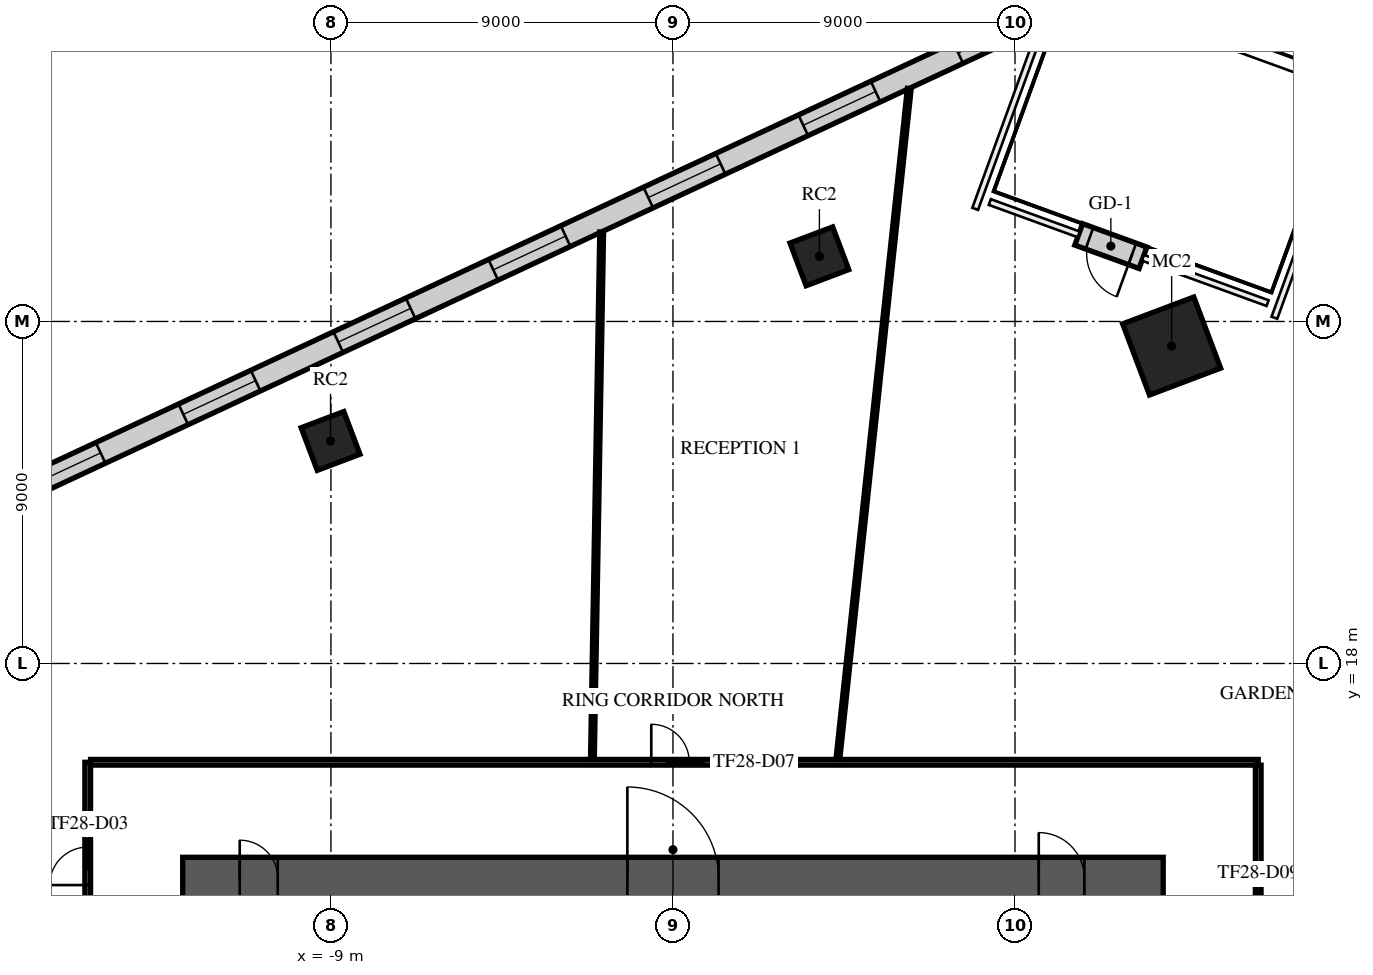
"""IFC4 building model, lengths in metres.
Left out: names, types, materials, properties, quantities, classifications, styles, units other than length and angle.
Written with IfcOpenShell. Run it as: python <this file> out.ifc"""

import sys

from ifc_helpers import new_model, si_unit, direction, frame, frame_2d, origin, origin_2d, place, context, subcontext, project, spatial, rectangle, extrude, element, fill, save


model = new_model("IFC4")
c1 = context("Model", 3, precision=1e-05, world=origin(), true_north=direction((0.0, 1.0)))
c2 = subcontext(c1, "Body", "Model", "MODEL_VIEW")
j1 = project(units=[si_unit("LENGTHUNIT", "METRE"), si_unit("PLANEANGLEUNIT", "RADIAN")], contexts=[c1])
p1 = place(None, origin())
s1 = spatial("IfcSite", under=j1, at=p1, CompositionType="ELEMENT")
p2 = place(p1, origin())
s2 = spatial("IfcBuilding", under=s1, at=p2, CompositionType="ELEMENT")
p3 = place(p2, frame((0.0, 0.0, 122.1)))
s3 = spatial("IfcBuildingStorey", under=s2, at=p3, CompositionType="ELEMENT", Elevation=122.1)
p4 = place(p3, frame((13.122, 26.354, 0.0), z_axis=(0.0, 0.0, 1.0), x_axis=(0.935491525991, 0.353349125935, 0.0)))
e1 = element("IfcColumn", 1, at=p4, inside=s3, PredefinedType="COLUMN", context=c2, shape_type="SweptSolid", body=[
    extrude(rectangle(XDim=2.0, YDim=2.0, at=origin_2d()), origin(), (0.0, 0.0, 1.0), 4.0),
])
for number, where, z_axis, x_axis in (
    (2, (3.853, 28.714, 0.0), (0.0, 0.0, 1.0), (0.935, 0.353, 0.0)),
    (3, (-9.01, 23.855, 0.0), (0.0, 0.0, 1.0), (0.935, 0.353, 0.0)),
):
    element("IfcColumn", number, at=place(p3, frame(where, z_axis=z_axis, x_axis=x_axis)), inside=s3, PredefinedType="COLUMN", context=c2, shape_type="SweptSolid", body=[
        extrude(rectangle(XDim=1.2, YDim=1.2, at=origin_2d()), origin(), (0.0, 0.0, 1.0), 4.0),
    ])
p5 = place(p3, frame((-12.9, 12.35, 0.0), z_axis=(0.0, 0.0, 1.0), x_axis=(1.0, 0.0, 0.0)))
e4 = element("IfcWall", 4, at=p5, inside=s3, PredefinedType="SHEAR", context=c2, shape_type="SweptSolid", body=[
    extrude(rectangle(XDim=25.8, YDim=1.1, at=frame_2d((12.9, 0.0))), origin(), (0.0, 0.0, 1.0), 3.58),
])
p6 = place(p5, frame((11.7, 0.0, 0.0)))
e5 = element("IfcOpeningElement", 5, at=p6, cuts=e4, PredefinedType="OPENING", context=c2, shape_type="SweptSolid", body=[
    extrude(rectangle(XDim=2.4, YDim=2.4, at=frame_2d((1.2, 1.2))), frame((0.0, 0.56, 0.0), z_axis=(0.0, -1.0, 0.0), x_axis=(1.0, 0.0, 0.0)), (0.0, 0.0, 1.0), 1.12),
])
p7 = place(p5, frame((22.525, 0.0, 0.0)))
e6 = element("IfcOpeningElement", 6, at=p7, cuts=e4, PredefinedType="OPENING", context=c2, shape_type="SweptSolid", body=[
    extrude(rectangle(XDim=1.2, YDim=2.1, at=frame_2d((0.6, 1.05))), frame((0.0, 0.56, 0.0), z_axis=(0.0, -1.0, 0.0), x_axis=(1.0, 0.0, 0.0)), (0.0, 0.0, 1.0), 1.12),
])
p8 = place(p5, frame((1.5, 0.0, 0.0)))
e7 = element("IfcOpeningElement", 7, at=p8, cuts=e4, PredefinedType="OPENING", context=c2, shape_type="SweptSolid", body=[
    extrude(rectangle(XDim=1.0, YDim=2.1, at=frame_2d((0.5, 1.05))), frame((0.0, 0.56, 0.0), z_axis=(0.0, -1.0, 0.0), x_axis=(1.0, 0.0, 0.0)), (0.0, 0.0, 1.0), 1.12),
])
p9 = place(p3, frame((10.498, 35.459, 0.0), z_axis=(0.0, 0.0, 1.0), x_axis=(-0.906307526065, -0.422618821396, 0.0)))
e8 = element("IfcWall", 8, at=p9, inside=s3, PredefinedType="STANDARD", context=c2, shape_type="SweptSolid", body=[
    extrude(rectangle(XDim=49.376, YDim=0.6, at=frame_2d((24.688, 0.0))), origin(), (0.0, 0.0, 1.0), 3.58),
])
p10 = place(p9, frame((1.2, 0.0, 0.9)))
e9 = element("IfcOpeningElement", 9, at=p10, cuts=e8, PredefinedType="OPENING", context=c2, shape_type="SweptSolid", body=[
    extrude(rectangle(XDim=2.1, YDim=2.1, at=frame_2d((1.05, 1.05))), frame((0.0, 0.31, 0.0), z_axis=(0.0, -1.0, 0.0), x_axis=(1.0, 0.0, 0.0)), (0.0, 0.0, 1.0), 0.62),
])
p11 = place(p9, frame((5.7, 0.0, 0.9)))
e10 = element("IfcOpeningElement", 10, at=p11, cuts=e8, PredefinedType="OPENING", context=c2, shape_type="SweptSolid", body=[
    extrude(rectangle(XDim=2.1, YDim=2.1, at=frame_2d((1.05, 1.05))), frame((0.0, 0.31, 0.0), z_axis=(0.0, -1.0, 0.0), x_axis=(1.0, 0.0, 0.0)), (0.0, 0.0, 1.0), 0.62),
])
p12 = place(p9, frame((10.2, 0.0, 0.9)))
e11 = element("IfcOpeningElement", 11, at=p12, cuts=e8, PredefinedType="OPENING", context=c2, shape_type="SweptSolid", body=[
    extrude(rectangle(XDim=2.1, YDim=2.1, at=frame_2d((1.05, 1.05))), frame((0.0, 0.31, 0.0), z_axis=(0.0, -1.0, 0.0), x_axis=(1.0, 0.0, 0.0)), (0.0, 0.0, 1.0), 0.62),
])
p13 = place(p9, frame((14.7, 0.0, 0.9)))
e12 = element("IfcOpeningElement", 12, at=p13, cuts=e8, PredefinedType="OPENING", context=c2, shape_type="SweptSolid", body=[
    extrude(rectangle(XDim=2.1, YDim=2.1, at=frame_2d((1.05, 1.05))), frame((0.0, 0.31, 0.0), z_axis=(0.0, -1.0, 0.0), x_axis=(1.0, 0.0, 0.0)), (0.0, 0.0, 1.0), 0.62),
])
p14 = place(p9, frame((19.2, 0.0, 0.9)))
e13 = element("IfcOpeningElement", 13, at=p14, cuts=e8, PredefinedType="OPENING", context=c2, shape_type="SweptSolid", body=[
    extrude(rectangle(XDim=2.1, YDim=2.1, at=frame_2d((1.05, 1.05))), frame((0.0, 0.31, 0.0), z_axis=(0.0, -1.0, 0.0), x_axis=(1.0, 0.0, 0.0)), (0.0, 0.0, 1.0), 0.62),
])
p15 = place(p9, frame((23.7, 0.0, 0.9)))
e14 = element("IfcOpeningElement", 14, at=p15, cuts=e8, PredefinedType="OPENING", context=c2, shape_type="SweptSolid", body=[
    extrude(rectangle(XDim=2.1, YDim=2.1, at=frame_2d((1.05, 1.05))), frame((0.0, 0.31, 0.0), z_axis=(0.0, -1.0, 0.0), x_axis=(1.0, 0.0, 0.0)), (0.0, 0.0, 1.0), 0.62),
])
p16 = place(p9, frame((28.2, 0.0, 0.9)))
e15 = element("IfcOpeningElement", 15, at=p16, cuts=e8, PredefinedType="OPENING", context=c2, shape_type="SweptSolid", body=[
    extrude(rectangle(XDim=2.1, YDim=2.1, at=frame_2d((1.05, 1.05))), frame((0.0, 0.31, 0.0), z_axis=(0.0, -1.0, 0.0), x_axis=(1.0, 0.0, 0.0)), (0.0, 0.0, 1.0), 0.62),
])
p17 = place(p9, frame((32.7, 0.0, 0.9)))
e16 = element("IfcOpeningElement", 16, at=p17, cuts=e8, PredefinedType="OPENING", context=c2, shape_type="SweptSolid", body=[
    extrude(rectangle(XDim=2.1, YDim=2.1, at=frame_2d((1.05, 1.05))), frame((0.0, 0.31, 0.0), z_axis=(0.0, -1.0, 0.0), x_axis=(1.0, 0.0, 0.0)), (0.0, 0.0, 1.0), 0.62),
])
p18 = place(p9, frame((37.2, 0.0, 0.9)))
e17 = element("IfcOpeningElement", 17, at=p18, cuts=e8, PredefinedType="OPENING", context=c2, shape_type="SweptSolid", body=[
    extrude(rectangle(XDim=2.1, YDim=2.1, at=frame_2d((1.05, 1.05))), frame((0.0, 0.31, 0.0), z_axis=(0.0, -1.0, 0.0), x_axis=(1.0, 0.0, 0.0)), (0.0, 0.0, 1.0), 0.62),
])
p19 = place(p9, frame((41.7, 0.0, 0.9)))
e18 = element("IfcOpeningElement", 18, at=p19, cuts=e8, PredefinedType="OPENING", context=c2, shape_type="SweptSolid", body=[
    extrude(rectangle(XDim=2.1, YDim=2.1, at=frame_2d((1.05, 1.05))), frame((0.0, 0.31, 0.0), z_axis=(0.0, -1.0, 0.0), x_axis=(1.0, 0.0, 0.0)), (0.0, 0.0, 1.0), 0.62),
])
p20 = place(p9, frame((46.138, 0.0, 0.9)))
e19 = element("IfcOpeningElement", 19, at=p20, cuts=e8, PredefinedType="OPENING", context=c2, shape_type="SweptSolid", body=[
    extrude(rectangle(XDim=2.1, YDim=2.1, at=frame_2d((1.05, 1.05))), frame((0.0, 0.31, 0.0), z_axis=(0.0, -1.0, 0.0), x_axis=(1.0, 0.0, 0.0)), (0.0, 0.0, 1.0), 0.62),
])
p21 = place(p3, frame((12.368, 28.676, 0.0), z_axis=(0.0, 0.0, 1.0), x_axis=(-0.939718154821, 0.341949980991, 0.0)))
e20 = element("IfcWall", 20, at=p21, inside=s3, PredefinedType="STANDARD", context=c2, shape_type="SweptSolid", body=[
    extrude(rectangle(XDim=1.8, YDim=0.6, at=frame_2d((0.9, 0.0))), origin(), (0.0, 0.0, 1.0), 3.58),
])
p22 = place(p21, frame((0.3, 0.0, 0.0)))
e21 = element("IfcOpeningElement", 21, at=p22, cuts=e20, PredefinedType="OPENING", context=c2, shape_type="SweptSolid", body=[
    extrude(rectangle(XDim=1.2, YDim=2.4, at=frame_2d((0.6, 1.2))), frame((0.0, 0.31, 0.0), z_axis=(0.0, -1.0, 0.0), x_axis=(1.0, 0.0, 0.0)), (0.0, 0.0, 1.0), 0.62),
])
p23 = place(p3, frame((-15.4, -15.4, 0.0), z_axis=(0.0, 0.0, 1.0), x_axis=(0.0, 1.0, 0.0)))
e22 = element("IfcWall", 22, at=p23, inside=s3, PredefinedType="PARTITIONING", context=c2, shape_type="SweptSolid", body=[
    extrude(rectangle(XDim=30.8, YDim=0.15, at=frame_2d((15.4, 0.0))), origin(), (0.0, 0.0, 1.0), 3.08),
])
p24 = place(p23, frame((13.024, 0.0, 0.0)))
e23 = element("IfcOpeningElement", 23, at=p24, cuts=e22, PredefinedType="OPENING", context=c2, shape_type="SweptSolid", body=[
    extrude(rectangle(XDim=1.0, YDim=2.1, at=frame_2d((0.5, 1.05))), frame((0.0, 0.085, 0.0), z_axis=(0.0, -1.0, 0.0), x_axis=(1.0, 0.0, 0.0)), (0.0, 0.0, 1.0), 0.17),
])
p25 = place(p23, frame((18.069, 0.0, 0.0)))
e24 = element("IfcOpeningElement", 24, at=p25, cuts=e22, PredefinedType="OPENING", context=c2, shape_type="SweptSolid", body=[
    extrude(rectangle(XDim=1.8, YDim=2.1, at=frame_2d((0.9, 1.05))), frame((0.0, 0.085, 0.0), z_axis=(0.0, -1.0, 0.0), x_axis=(1.0, 0.0, 0.0)), (0.0, 0.0, 1.0), 0.17),
])
p26 = place(p23, frame((27.569, 0.0, 0.0)))
e25 = element("IfcOpeningElement", 25, at=p26, cuts=e22, PredefinedType="OPENING", context=c2, shape_type="SweptSolid", body=[
    extrude(rectangle(XDim=1.0, YDim=2.1, at=frame_2d((0.5, 1.05))), frame((0.0, 0.085, 0.0), z_axis=(0.0, -1.0, 0.0), x_axis=(1.0, 0.0, 0.0)), (0.0, 0.0, 1.0), 0.17),
])
p27 = place(p23, frame((3.3, 0.0, 0.0)))
e26 = element("IfcOpeningElement", 26, at=p27, cuts=e22, PredefinedType="OPENING", context=c2, shape_type="SweptSolid", body=[
    extrude(rectangle(XDim=1.8, YDim=2.1, at=frame_2d((0.9, 1.05))), frame((0.0, 0.085, 0.0), z_axis=(0.0, -1.0, 0.0), x_axis=(1.0, 0.0, 0.0)), (0.0, 0.0, 1.0), 0.17),
])
p28 = place(p3, frame((-15.325, 15.4, 0.0), z_axis=(0.0, 0.0, 1.0), x_axis=(1.0, 0.0, 0.0)))
e27 = element("IfcWall", 27, at=p28, inside=s3, PredefinedType="PARTITIONING", context=c2, shape_type="SweptSolid", body=[
    extrude(rectangle(XDim=30.725, YDim=0.15, at=frame_2d((15.362, 0.0))), origin(), (0.0, 0.0, 1.0), 3.08),
])
p29 = place(p28, frame((14.754, 0.0, 0.0)))
e28 = element("IfcOpeningElement", 28, at=p29, cuts=e27, PredefinedType="OPENING", context=c2, shape_type="SweptSolid", body=[
    extrude(rectangle(XDim=1.0, YDim=2.1, at=frame_2d((0.5, 1.05))), frame((0.0, 0.085, 0.0), z_axis=(0.0, -1.0, 0.0), x_axis=(1.0, 0.0, 0.0)), (0.0, 0.0, 1.0), 0.17),
])
p30 = place(p3, frame((15.4, -15.325, 0.0), z_axis=(0.0, 0.0, 1.0), x_axis=(0.0, 1.0, 0.0)))
e29 = element("IfcWall", 29, at=p30, inside=s3, PredefinedType="PARTITIONING", context=c2, shape_type="SweptSolid", body=[
    extrude(rectangle(XDim=30.65, YDim=0.15, at=frame_2d((15.325, 0.0))), origin(), (0.0, 0.0, 1.0), 3.08),
])
p31 = place(p30, frame((21.198, 0.0, 0.0)))
e30 = element("IfcOpeningElement", 30, at=p31, cuts=e29, PredefinedType="OPENING", context=c2, shape_type="SweptSolid", body=[
    extrude(rectangle(XDim=1.8, YDim=2.1, at=frame_2d((0.9, 1.05))), frame((0.0, 0.085, 0.0), z_axis=(0.0, -1.0, 0.0), x_axis=(1.0, 0.0, 0.0)), (0.0, 0.0, 1.0), 0.17),
])
p32 = place(p30, frame((26.198, 0.0, 0.0)))
e31 = element("IfcOpeningElement", 31, at=p32, cuts=e29, PredefinedType="OPENING", context=c2, shape_type="SweptSolid", body=[
    extrude(rectangle(XDim=1.0, YDim=2.1, at=frame_2d((0.5, 1.05))), frame((0.0, 0.085, 0.0), z_axis=(0.0, -1.0, 0.0), x_axis=(1.0, 0.0, 0.0)), (0.0, 0.0, 1.0), 0.17),
])
p33 = place(p30, frame((8.3, 0.0, 0.0)))
e32 = element("IfcOpeningElement", 32, at=p33, cuts=e29, PredefinedType="OPENING", context=c2, shape_type="SweptSolid", body=[
    extrude(rectangle(XDim=1.0, YDim=2.1, at=frame_2d((0.5, 1.05))), frame((0.0, 0.085, 0.0), z_axis=(0.0, -1.0, 0.0), x_axis=(1.0, 0.0, 0.0)), (0.0, 0.0, 1.0), 0.17),
])
p34 = place(p30, frame((13.856, 0.0, 0.0)))
e33 = element("IfcOpeningElement", 33, at=p34, cuts=e29, PredefinedType="OPENING", context=c2, shape_type="SweptSolid", body=[
    extrude(rectangle(XDim=1.0, YDim=2.1, at=frame_2d((0.5, 1.05))), frame((0.0, 0.085, 0.0), z_axis=(0.0, -1.0, 0.0), x_axis=(1.0, 0.0, 0.0)), (0.0, 0.0, 1.0), 0.17),
])
p35 = place(p3, frame((-2.12, 15.476, 0.0), z_axis=(0.0, 0.0, 1.0), x_axis=(0.017569228937, 0.999845649185, 0.0)))
e34 = element("IfcWall", 34, at=p35, inside=s3, PredefinedType="PARTITIONING", context=c2, shape_type="SweptSolid", body=[
    extrude(rectangle(XDim=13.882, YDim=0.1, at=frame_2d((6.941, 0.0))), origin(), (0.0, 0.0, 1.0), 2.83),
])
p36 = place(p3, frame((4.34, 15.48, 0.0), z_axis=(0.0, 0.0, 1.0), x_axis=(0.105856083798, 0.99438146077, 0.0)))
e35 = element("IfcWall", 35, at=p36, inside=s3, PredefinedType="PARTITIONING", context=c2, shape_type="SweptSolid", body=[
    extrude(rectangle(XDim=17.75, YDim=0.1, at=frame_2d((8.875, 0.0))), origin(), (0.0, 0.0, 1.0), 2.83),
])
p37 = place(p6, origin())
e36 = element("IfcDoor", 36, at=p37, inside=s3, OperationType="SINGLE_SWING_LEFT", PredefinedType="DOOR", context=c2, shape_type="SweptSolid", body=[
    extrude(rectangle(XDim=2.4, YDim=2.4, at=frame_2d((1.2, 1.2))), frame((0.0, 0.025, 0.0), z_axis=(0.0, -1.0, 0.0), x_axis=(1.0, 0.0, 0.0)), (0.0, 0.0, 1.0), 0.05),
])
fill(e5, e36)
p38 = place(p7, origin())
e37 = element("IfcDoor", 37, at=p38, inside=s3, OperationType="SINGLE_SWING_LEFT", PredefinedType="DOOR", context=c2, shape_type="SweptSolid", body=[
    extrude(rectangle(XDim=1.2, YDim=2.1, at=frame_2d((0.6, 1.05))), frame((0.0, 0.025, 0.0), z_axis=(0.0, -1.0, 0.0), x_axis=(1.0, 0.0, 0.0)), (0.0, 0.0, 1.0), 0.05),
])
fill(e6, e37)
p39 = place(p8, origin())
e38 = element("IfcDoor", 38, at=p39, inside=s3, OperationType="SINGLE_SWING_LEFT", PredefinedType="DOOR", context=c2, shape_type="SweptSolid", body=[
    extrude(rectangle(XDim=1.0, YDim=2.1, at=frame_2d((0.5, 1.05))), frame((0.0, 0.025, 0.0), z_axis=(0.0, -1.0, 0.0), x_axis=(1.0, 0.0, 0.0)), (0.0, 0.0, 1.0), 0.05),
])
fill(e7, e38)
p40 = place(p10, origin())
e39 = element("IfcWindow", 39, at=p40, inside=s3, PartitioningType="SINGLE_PANEL", PredefinedType="WINDOW", context=c2, shape_type="SweptSolid", body=[
    extrude(rectangle(XDim=2.1, YDim=2.1, at=frame_2d((1.05, 1.05))), frame((0.0, 0.03, 0.0), z_axis=(0.0, -1.0, 0.0), x_axis=(1.0, 0.0, 0.0)), (0.0, 0.0, 1.0), 0.06),
])
fill(e9, e39)
p41 = place(p11, origin())
e40 = element("IfcWindow", 40, at=p41, inside=s3, PartitioningType="SINGLE_PANEL", PredefinedType="WINDOW", context=c2, shape_type="SweptSolid", body=[
    extrude(rectangle(XDim=2.1, YDim=2.1, at=frame_2d((1.05, 1.05))), frame((0.0, 0.03, 0.0), z_axis=(0.0, -1.0, 0.0), x_axis=(1.0, 0.0, 0.0)), (0.0, 0.0, 1.0), 0.06),
])
fill(e10, e40)
p42 = place(p12, origin())
e41 = element("IfcWindow", 41, at=p42, inside=s3, PartitioningType="SINGLE_PANEL", PredefinedType="WINDOW", context=c2, shape_type="SweptSolid", body=[
    extrude(rectangle(XDim=2.1, YDim=2.1, at=frame_2d((1.05, 1.05))), frame((0.0, 0.03, 0.0), z_axis=(0.0, -1.0, 0.0), x_axis=(1.0, 0.0, 0.0)), (0.0, 0.0, 1.0), 0.06),
])
fill(e11, e41)
p43 = place(p13, origin())
e42 = element("IfcWindow", 42, at=p43, inside=s3, PartitioningType="SINGLE_PANEL", PredefinedType="WINDOW", context=c2, shape_type="SweptSolid", body=[
    extrude(rectangle(XDim=2.1, YDim=2.1, at=frame_2d((1.05, 1.05))), frame((0.0, 0.03, 0.0), z_axis=(0.0, -1.0, 0.0), x_axis=(1.0, 0.0, 0.0)), (0.0, 0.0, 1.0), 0.06),
])
fill(e12, e42)
p44 = place(p14, origin())
e43 = element("IfcWindow", 43, at=p44, inside=s3, PartitioningType="SINGLE_PANEL", PredefinedType="WINDOW", context=c2, shape_type="SweptSolid", body=[
    extrude(rectangle(XDim=2.1, YDim=2.1, at=frame_2d((1.05, 1.05))), frame((0.0, 0.03, 0.0), z_axis=(0.0, -1.0, 0.0), x_axis=(1.0, 0.0, 0.0)), (0.0, 0.0, 1.0), 0.06),
])
fill(e13, e43)
p45 = place(p15, origin())
e44 = element("IfcWindow", 44, at=p45, inside=s3, PartitioningType="SINGLE_PANEL", PredefinedType="WINDOW", context=c2, shape_type="SweptSolid", body=[
    extrude(rectangle(XDim=2.1, YDim=2.1, at=frame_2d((1.05, 1.05))), frame((0.0, 0.03, 0.0), z_axis=(0.0, -1.0, 0.0), x_axis=(1.0, 0.0, 0.0)), (0.0, 0.0, 1.0), 0.06),
])
fill(e14, e44)
p46 = place(p16, origin())
e45 = element("IfcWindow", 45, at=p46, inside=s3, PartitioningType="SINGLE_PANEL", PredefinedType="WINDOW", context=c2, shape_type="SweptSolid", body=[
    extrude(rectangle(XDim=2.1, YDim=2.1, at=frame_2d((1.05, 1.05))), frame((0.0, 0.03, 0.0), z_axis=(0.0, -1.0, 0.0), x_axis=(1.0, 0.0, 0.0)), (0.0, 0.0, 1.0), 0.06),
])
fill(e15, e45)
p47 = place(p22, origin())
e46 = element("IfcDoor", 46, at=p47, inside=s3, OperationType="SINGLE_SWING_LEFT", PredefinedType="DOOR", context=c2, shape_type="SweptSolid", body=[
    extrude(rectangle(XDim=1.2, YDim=2.4, at=frame_2d((0.6, 1.2))), frame((0.0, 0.025, 0.0), z_axis=(0.0, -1.0, 0.0), x_axis=(1.0, 0.0, 0.0)), (0.0, 0.0, 1.0), 0.05),
])
fill(e21, e46)
p48 = place(p26, origin())
e47 = element("IfcDoor", 47, at=p48, inside=s3, OperationType="SINGLE_SWING_LEFT", PredefinedType="DOOR", context=c2, shape_type="SweptSolid", body=[
    extrude(rectangle(XDim=1.0, YDim=2.1, at=frame_2d((0.5, 1.05))), frame((0.0, 0.025, 0.0), z_axis=(0.0, -1.0, 0.0), x_axis=(1.0, 0.0, 0.0)), (0.0, 0.0, 1.0), 0.05),
])
fill(e25, e47)
p49 = place(p29, origin())
e48 = element("IfcDoor", 48, at=p49, inside=s3, OperationType="SINGLE_SWING_LEFT", PredefinedType="DOOR", context=c2, shape_type="SweptSolid", body=[
    extrude(rectangle(XDim=1.0, YDim=2.1, at=frame_2d((0.5, 1.05))), frame((0.0, 0.025, 0.0), z_axis=(0.0, -1.0, 0.0), x_axis=(1.0, 0.0, 0.0)), (0.0, 0.0, 1.0), 0.05),
])
fill(e28, e48)
save(model, sys.argv[1])
